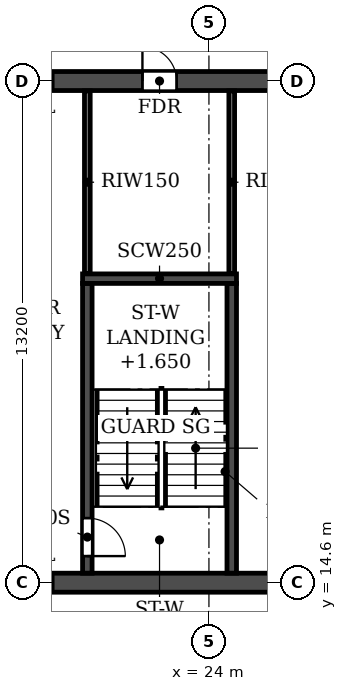
"""IFC4 building model, lengths in metres.
Left out: names, types, materials, properties, quantities, classifications, styles, units other than length and angle.
Written with IfcOpenShell. Run it as: python <this file> out.ifc"""

import sys

from ifc_helpers import new_model, si_unit, direction, frame, frame_2d, origin, place, context, subcontext, project, spatial, rectangle, extrude, element, fill, save


model = new_model("IFC4")
c1 = context("Model", 3, precision=1e-05, world=origin(), true_north=direction((0.0, 1.0)))
c2 = subcontext(c1, "Body", "Model", "MODEL_VIEW")
j1 = project(units=[si_unit("LENGTHUNIT", "METRE"), si_unit("PLANEANGLEUNIT", "RADIAN")], contexts=[c1])
p1 = place(None, origin())
s1 = spatial("IfcSite", under=j1, at=p1, CompositionType="ELEMENT")
p2 = place(p1, origin())
s2 = spatial("IfcBuilding", under=s1, at=p2, CompositionType="ELEMENT")
p3 = place(p2, frame((0.0, 0.0, 76.2)))
s3 = spatial("IfcBuildingStorey", under=s2, at=p3, CompositionType="ELEMENT", Elevation=76.2)
p4 = place(p3, frame((8.6, 14.6, 0.0), z_axis=(0.0, 0.0, 1.0), x_axis=(1.0, 0.0, 0.0)))
e1 = element("IfcWall", 1, at=p4, inside=s3, PredefinedType="SOLIDWALL", context=c2, shape_type="SweptSolid", body=[
    extrude(rectangle(XDim=84.8, YDim=0.5, at=frame_2d((42.4, 0.0))), origin(), (0.0, 0.0, 1.0), 3.06),
])
p5 = place(p4, frame((2.25, 0.0, 0.0)))
e2 = element("IfcOpeningElement", 2, at=p5, cuts=e1, PredefinedType="OPENING", context=c2, shape_type="SweptSolid", body=[
    extrude(rectangle(XDim=1.0, YDim=2.1, at=frame_2d((0.5, 1.05))), frame((0.0, 0.26, 0.0), z_axis=(0.0, -1.0, 0.0), x_axis=(1.0, 0.0, 0.0)), (0.0, 0.0, 1.0), 0.52),
])
p6 = place(p4, frame((6.95, 0.0, 0.0)))
e3 = element("IfcOpeningElement", 3, at=p6, cuts=e1, PredefinedType="OPENING", context=c2, shape_type="SweptSolid", body=[
    extrude(rectangle(XDim=1.0, YDim=2.1, at=frame_2d((0.5, 1.05))), frame((0.0, 0.26, 0.0), z_axis=(0.0, -1.0, 0.0), x_axis=(1.0, 0.0, 0.0)), (0.0, 0.0, 1.0), 0.52),
])
p7 = place(p4, frame((10.3, 0.0, 0.0)))
e4 = element("IfcOpeningElement", 4, at=p7, cuts=e1, PredefinedType="OPENING", context=c2, shape_type="SweptSolid", body=[
    extrude(rectangle(XDim=1.0, YDim=2.1, at=frame_2d((0.5, 1.05))), frame((0.0, 0.26, 0.0), z_axis=(0.0, -1.0, 0.0), x_axis=(1.0, 0.0, 0.0)), (0.0, 0.0, 1.0), 0.52),
])
p8 = place(p4, frame((18.2, 0.0, 0.0)))
e5 = element("IfcOpeningElement", 5, at=p8, cuts=e1, PredefinedType="OPENING", context=c2, shape_type="SweptSolid", body=[
    extrude(rectangle(XDim=1.0, YDim=2.1, at=frame_2d((0.5, 1.05))), frame((0.0, 0.26, 0.0), z_axis=(0.0, -1.0, 0.0), x_axis=(1.0, 0.0, 0.0)), (0.0, 0.0, 1.0), 0.52),
])
p9 = place(p4, frame((22.8, 0.0, 0.0)))
e6 = element("IfcOpeningElement", 6, at=p9, cuts=e1, PredefinedType="OPENING", context=c2, shape_type="SweptSolid", body=[
    extrude(rectangle(XDim=1.0, YDim=2.1, at=frame_2d((0.5, 1.05))), frame((0.0, 0.26, 0.0), z_axis=(0.0, -1.0, 0.0), x_axis=(1.0, 0.0, 0.0)), (0.0, 0.0, 1.0), 0.52),
])
p10 = place(p4, frame((35.4, 0.0, 0.0)))
e7 = element("IfcOpeningElement", 7, at=p10, cuts=e1, PredefinedType="OPENING", context=c2, shape_type="SweptSolid", body=[
    extrude(rectangle(XDim=1.0, YDim=2.1, at=frame_2d((0.5, 1.05))), frame((0.0, 0.26, 0.0), z_axis=(0.0, -1.0, 0.0), x_axis=(1.0, 0.0, 0.0)), (0.0, 0.0, 1.0), 0.52),
])
p11 = place(p4, frame((39.3, 0.0, 0.0)))
e8 = element("IfcOpeningElement", 8, at=p11, cuts=e1, PredefinedType="OPENING", context=c2, shape_type="SweptSolid", body=[
    extrude(rectangle(XDim=1.0, YDim=2.1, at=frame_2d((0.5, 1.05))), frame((0.0, 0.26, 0.0), z_axis=(0.0, -1.0, 0.0), x_axis=(1.0, 0.0, 0.0)), (0.0, 0.0, 1.0), 0.52),
])
p12 = place(p4, frame((41.9, 0.0, 0.0)))
e9 = element("IfcOpeningElement", 9, at=p12, cuts=e1, PredefinedType="OPENING", context=c2, shape_type="SweptSolid", body=[
    extrude(rectangle(XDim=1.0, YDim=2.1, at=frame_2d((0.5, 1.05))), frame((0.0, 0.26, 0.0), z_axis=(0.0, -1.0, 0.0), x_axis=(1.0, 0.0, 0.0)), (0.0, 0.0, 1.0), 0.52),
])
p13 = place(p4, frame((44.5, 0.0, 0.0)))
e10 = element("IfcOpeningElement", 10, at=p13, cuts=e1, PredefinedType="OPENING", context=c2, shape_type="SweptSolid", body=[
    extrude(rectangle(XDim=1.0, YDim=2.1, at=frame_2d((0.5, 1.05))), frame((0.0, 0.26, 0.0), z_axis=(0.0, -1.0, 0.0), x_axis=(1.0, 0.0, 0.0)), (0.0, 0.0, 1.0), 0.52),
])
p14 = place(p4, frame((48.4, 0.0, 0.0)))
e11 = element("IfcOpeningElement", 11, at=p14, cuts=e1, PredefinedType="OPENING", context=c2, shape_type="SweptSolid", body=[
    extrude(rectangle(XDim=1.0, YDim=2.1, at=frame_2d((0.5, 1.05))), frame((0.0, 0.26, 0.0), z_axis=(0.0, -1.0, 0.0), x_axis=(1.0, 0.0, 0.0)), (0.0, 0.0, 1.0), 0.52),
])
p15 = place(p4, frame((61.0, 0.0, 0.0)))
e12 = element("IfcOpeningElement", 12, at=p15, cuts=e1, PredefinedType="OPENING", context=c2, shape_type="SweptSolid", body=[
    extrude(rectangle(XDim=1.0, YDim=2.1, at=frame_2d((0.5, 1.05))), frame((0.0, 0.26, 0.0), z_axis=(0.0, -1.0, 0.0), x_axis=(1.0, 0.0, 0.0)), (0.0, 0.0, 1.0), 0.52),
])
p16 = place(p4, frame((65.6, 0.0, 0.0)))
e13 = element("IfcOpeningElement", 13, at=p16, cuts=e1, PredefinedType="OPENING", context=c2, shape_type="SweptSolid", body=[
    extrude(rectangle(XDim=1.0, YDim=2.1, at=frame_2d((0.5, 1.05))), frame((0.0, 0.26, 0.0), z_axis=(0.0, -1.0, 0.0), x_axis=(1.0, 0.0, 0.0)), (0.0, 0.0, 1.0), 0.52),
])
p17 = place(p4, frame((73.5, 0.0, 0.0)))
e14 = element("IfcOpeningElement", 14, at=p17, cuts=e1, PredefinedType="OPENING", context=c2, shape_type="SweptSolid", body=[
    extrude(rectangle(XDim=1.0, YDim=2.1, at=frame_2d((0.5, 1.05))), frame((0.0, 0.26, 0.0), z_axis=(0.0, -1.0, 0.0), x_axis=(1.0, 0.0, 0.0)), (0.0, 0.0, 1.0), 0.52),
])
p18 = place(p4, frame((76.55, 0.0, 0.0)))
e15 = element("IfcOpeningElement", 15, at=p18, cuts=e1, PredefinedType="OPENING", context=c2, shape_type="SweptSolid", body=[
    extrude(rectangle(XDim=1.0, YDim=2.1, at=frame_2d((0.5, 1.05))), frame((0.0, 0.26, 0.0), z_axis=(0.0, -1.0, 0.0), x_axis=(1.0, 0.0, 0.0)), (0.0, 0.0, 1.0), 0.52),
])
p19 = place(p4, frame((81.0, 0.0, 0.0)))
e16 = element("IfcOpeningElement", 16, at=p19, cuts=e1, PredefinedType="OPENING", context=c2, shape_type="SweptSolid", body=[
    extrude(rectangle(XDim=1.5, YDim=2.1, at=frame_2d((0.75, 1.05))), frame((0.0, 0.26, 0.0), z_axis=(0.0, -1.0, 0.0), x_axis=(1.0, 0.0, 0.0)), (0.0, 0.0, 1.0), 0.52),
])
p20 = place(p3, frame((8.6, 27.8, 0.0), z_axis=(0.0, 0.0, 1.0), x_axis=(1.0, 0.0, 0.0)))
e17 = element("IfcWall", 17, at=p20, inside=s3, PredefinedType="SOLIDWALL", context=c2, shape_type="SweptSolid", body=[
    extrude(rectangle(XDim=84.8, YDim=0.5, at=frame_2d((42.4, 0.0))), origin(), (0.0, 0.0, 1.0), 3.06),
])
p21 = place(p20, frame((2.0, 0.0, 0.0)))
e18 = element("IfcOpeningElement", 18, at=p21, cuts=e17, PredefinedType="OPENING", context=c2, shape_type="SweptSolid", body=[
    extrude(rectangle(XDim=1.5, YDim=2.1, at=frame_2d((0.75, 1.05))), frame((0.0, 0.26, 0.0), z_axis=(0.0, -1.0, 0.0), x_axis=(1.0, 0.0, 0.0)), (0.0, 0.0, 1.0), 0.52),
])
p22 = place(p20, frame((6.95, 0.0, 0.0)))
e19 = element("IfcOpeningElement", 19, at=p22, cuts=e17, PredefinedType="OPENING", context=c2, shape_type="SweptSolid", body=[
    extrude(rectangle(XDim=1.0, YDim=2.1, at=frame_2d((0.5, 1.05))), frame((0.0, 0.26, 0.0), z_axis=(0.0, -1.0, 0.0), x_axis=(1.0, 0.0, 0.0)), (0.0, 0.0, 1.0), 0.52),
])
p23 = place(p20, frame((10.3, 0.0, 0.0)))
e20 = element("IfcOpeningElement", 20, at=p23, cuts=e17, PredefinedType="OPENING", context=c2, shape_type="SweptSolid", body=[
    extrude(rectangle(XDim=1.0, YDim=2.1, at=frame_2d((0.5, 1.05))), frame((0.0, 0.26, 0.0), z_axis=(0.0, -1.0, 0.0), x_axis=(1.0, 0.0, 0.0)), (0.0, 0.0, 1.0), 0.52),
])
p24 = place(p20, frame((13.65, 0.0, 0.0)))
e21 = element("IfcOpeningElement", 21, at=p24, cuts=e17, PredefinedType="OPENING", context=c2, shape_type="SweptSolid", body=[
    extrude(rectangle(XDim=0.9, YDim=2.1, at=frame_2d((0.45, 1.05))), frame((0.0, 0.26, 0.0), z_axis=(0.0, -1.0, 0.0), x_axis=(1.0, 0.0, 0.0)), (0.0, 0.0, 1.0), 0.52),
])
p25 = place(p20, frame((22.85, 0.0, 0.0)))
e22 = element("IfcOpeningElement", 22, at=p25, cuts=e17, PredefinedType="OPENING", context=c2, shape_type="SweptSolid", body=[
    extrude(rectangle(XDim=0.9, YDim=2.1, at=frame_2d((0.45, 1.05))), frame((0.0, 0.26, 0.0), z_axis=(0.0, -1.0, 0.0), x_axis=(1.0, 0.0, 0.0)), (0.0, 0.0, 1.0), 0.52),
])
p26 = place(p20, frame((26.0, 0.0, 0.0)))
e23 = element("IfcOpeningElement", 23, at=p26, cuts=e17, PredefinedType="OPENING", context=c2, shape_type="SweptSolid", body=[
    extrude(rectangle(XDim=1.0, YDim=2.1, at=frame_2d((0.5, 1.05))), frame((0.0, 0.26, 0.0), z_axis=(0.0, -1.0, 0.0), x_axis=(1.0, 0.0, 0.0)), (0.0, 0.0, 1.0), 0.52),
])
p27 = place(p20, frame((31.2, 0.0, 0.0)))
e24 = element("IfcOpeningElement", 24, at=p27, cuts=e17, PredefinedType="OPENING", context=c2, shape_type="SweptSolid", body=[
    extrude(rectangle(XDim=1.0, YDim=2.1, at=frame_2d((0.5, 1.05))), frame((0.0, 0.26, 0.0), z_axis=(0.0, -1.0, 0.0), x_axis=(1.0, 0.0, 0.0)), (0.0, 0.0, 1.0), 0.52),
])
p28 = place(p20, frame((39.0, 0.0, 0.0)))
e25 = element("IfcOpeningElement", 25, at=p28, cuts=e17, PredefinedType="OPENING", context=c2, shape_type="SweptSolid", body=[
    extrude(rectangle(XDim=1.0, YDim=2.1, at=frame_2d((0.5, 1.05))), frame((0.0, 0.26, 0.0), z_axis=(0.0, -1.0, 0.0), x_axis=(1.0, 0.0, 0.0)), (0.0, 0.0, 1.0), 0.52),
])
p29 = place(p20, frame((41.9, 0.0, 0.0)))
e26 = element("IfcOpeningElement", 26, at=p29, cuts=e17, PredefinedType="OPENING", context=c2, shape_type="SweptSolid", body=[
    extrude(rectangle(XDim=1.0, YDim=2.1, at=frame_2d((0.5, 1.05))), frame((0.0, 0.26, 0.0), z_axis=(0.0, -1.0, 0.0), x_axis=(1.0, 0.0, 0.0)), (0.0, 0.0, 1.0), 0.52),
])
p30 = place(p20, frame((44.8, 0.0, 0.0)))
e27 = element("IfcOpeningElement", 27, at=p30, cuts=e17, PredefinedType="OPENING", context=c2, shape_type="SweptSolid", body=[
    extrude(rectangle(XDim=1.0, YDim=2.1, at=frame_2d((0.5, 1.05))), frame((0.0, 0.26, 0.0), z_axis=(0.0, -1.0, 0.0), x_axis=(1.0, 0.0, 0.0)), (0.0, 0.0, 1.0), 0.52),
])
p31 = place(p20, frame((48.7, 0.0, 0.0)))
e28 = element("IfcOpeningElement", 28, at=p31, cuts=e17, PredefinedType="OPENING", context=c2, shape_type="SweptSolid", body=[
    extrude(rectangle(XDim=1.0, YDim=2.1, at=frame_2d((0.5, 1.05))), frame((0.0, 0.26, 0.0), z_axis=(0.0, -1.0, 0.0), x_axis=(1.0, 0.0, 0.0)), (0.0, 0.0, 1.0), 0.52),
])
p32 = place(p20, frame((55.2, 0.0, 0.0)))
e29 = element("IfcOpeningElement", 29, at=p32, cuts=e17, PredefinedType="OPENING", context=c2, shape_type="SweptSolid", body=[
    extrude(rectangle(XDim=1.0, YDim=2.1, at=frame_2d((0.5, 1.05))), frame((0.0, 0.26, 0.0), z_axis=(0.0, -1.0, 0.0), x_axis=(1.0, 0.0, 0.0)), (0.0, 0.0, 1.0), 0.52),
])
p33 = place(p20, frame((61.05, 0.0, 0.0)))
e30 = element("IfcOpeningElement", 30, at=p33, cuts=e17, PredefinedType="OPENING", context=c2, shape_type="SweptSolid", body=[
    extrude(rectangle(XDim=0.9, YDim=2.1, at=frame_2d((0.45, 1.05))), frame((0.0, 0.26, 0.0), z_axis=(0.0, -1.0, 0.0), x_axis=(1.0, 0.0, 0.0)), (0.0, 0.0, 1.0), 0.52),
])
p34 = place(p20, frame((70.25, 0.0, 0.0)))
e31 = element("IfcOpeningElement", 31, at=p34, cuts=e17, PredefinedType="OPENING", context=c2, shape_type="SweptSolid", body=[
    extrude(rectangle(XDim=0.9, YDim=2.1, at=frame_2d((0.45, 1.05))), frame((0.0, 0.26, 0.0), z_axis=(0.0, -1.0, 0.0), x_axis=(1.0, 0.0, 0.0)), (0.0, 0.0, 1.0), 0.52),
])
p35 = place(p20, frame((73.5, 0.0, 0.0)))
e32 = element("IfcOpeningElement", 32, at=p35, cuts=e17, PredefinedType="OPENING", context=c2, shape_type="SweptSolid", body=[
    extrude(rectangle(XDim=1.0, YDim=2.1, at=frame_2d((0.5, 1.05))), frame((0.0, 0.26, 0.0), z_axis=(0.0, -1.0, 0.0), x_axis=(1.0, 0.0, 0.0)), (0.0, 0.0, 1.0), 0.52),
])
p36 = place(p20, frame((76.25, 0.0, 0.0)))
e33 = element("IfcOpeningElement", 33, at=p36, cuts=e17, PredefinedType="OPENING", context=c2, shape_type="SweptSolid", body=[
    extrude(rectangle(XDim=1.0, YDim=2.1, at=frame_2d((0.5, 1.05))), frame((0.0, 0.26, 0.0), z_axis=(0.0, -1.0, 0.0), x_axis=(1.0, 0.0, 0.0)), (0.0, 0.0, 1.0), 0.52),
])
p37 = place(p20, frame((80.95, 0.0, 0.0)))
e34 = element("IfcOpeningElement", 34, at=p37, cuts=e17, PredefinedType="OPENING", context=c2, shape_type="SweptSolid", body=[
    extrude(rectangle(XDim=1.0, YDim=2.1, at=frame_2d((0.5, 1.05))), frame((0.0, 0.26, 0.0), z_axis=(0.0, -1.0, 0.0), x_axis=(1.0, 0.0, 0.0)), (0.0, 0.0, 1.0), 0.52),
])
p38 = place(p3, frame((20.8, 14.85, 0.0), z_axis=(0.0, 0.0, 1.0), x_axis=(0.0, 1.0, 0.0)))
e35 = element("IfcWall", 35, at=p38, inside=s3, PredefinedType="SOLIDWALL", context=c2, shape_type="SweptSolid", body=[
    extrude(rectangle(XDim=7.625, YDim=0.25, at=frame_2d((3.812, 0.0))), origin(), (0.0, 0.0, 1.0), 3.06),
])
p39 = place(p38, frame((0.45, 0.0, 0.0)))
e36 = element("IfcOpeningElement", 36, at=p39, cuts=e35, PredefinedType="OPENING", context=c2, shape_type="SweptSolid", body=[
    extrude(rectangle(XDim=1.0, YDim=2.1, at=frame_2d((0.5, 1.05))), frame((0.0, 0.135, 0.0), z_axis=(0.0, -1.0, 0.0), x_axis=(1.0, 0.0, 0.0)), (0.0, 0.0, 1.0), 0.27),
])
p40 = place(p3, frame((24.6, 14.85, 0.0), z_axis=(0.0, 0.0, 1.0), x_axis=(0.0, 1.0, 0.0)))
e37 = element("IfcWall", 37, at=p40, inside=s3, PredefinedType="SOLIDWALL", context=c2, shape_type="SweptSolid", body=[
    extrude(rectangle(XDim=7.625, YDim=0.25, at=frame_2d((3.812, 0.0))), origin(), (0.0, 0.0, 1.0), 3.06),
])
p41 = place(p3, frame((20.675, 22.6, 0.0), z_axis=(0.0, 0.0, 1.0), x_axis=(1.0, 0.0, 0.0)))
e38 = element("IfcWall", 38, at=p41, inside=s3, PredefinedType="SOLIDWALL", context=c2, shape_type="SweptSolid", body=[
    extrude(rectangle(XDim=4.05, YDim=0.25, at=frame_2d((2.025, 0.0))), origin(), (0.0, 0.0, 1.0), 3.06),
])
for number, where, z_axis, x_axis in (
    (39, (20.8, 22.735, 0.0), (0.0, 0.0, 1.0), (0.0, 1.0, 0.0)),
    (40, (24.6, 22.735, 0.0), (0.0, 0.0, 1.0), (0.0, 1.0, 0.0)),
):
    element("IfcWall", number, at=place(p3, frame(where, z_axis=z_axis, x_axis=x_axis)), inside=s3, PredefinedType="PARTITIONING", context=c2, shape_type="SweptSolid", body=[
        extrude(rectangle(XDim=4.805, YDim=0.15, at=frame_2d((2.402, 0.0))), origin(), (0.0, 0.0, 1.0), 3.06),
    ])
p42 = place(p23, origin())
e41 = element("IfcDoor", 41, at=p42, inside=s3, OperationType="SINGLE_SWING_LEFT", PredefinedType="DOOR", context=c2, shape_type="SweptSolid", body=[
    extrude(rectangle(XDim=1.0, YDim=2.1, at=frame_2d((0.5, 1.05))), frame((0.0, 0.025, 0.0), z_axis=(0.0, -1.0, 0.0), x_axis=(1.0, 0.0, 0.0)), (0.0, 0.0, 1.0), 0.05),
])
fill(e20, e41)
p43 = place(p24, origin())
e42 = element("IfcDoor", 42, at=p43, inside=s3, OperationType="SINGLE_SWING_LEFT", PredefinedType="DOOR", context=c2, shape_type="SweptSolid", body=[
    extrude(rectangle(XDim=0.9, YDim=2.1, at=frame_2d((0.45, 1.05))), frame((0.0, 0.025, 0.0), z_axis=(0.0, -1.0, 0.0), x_axis=(1.0, 0.0, 0.0)), (0.0, 0.0, 1.0), 0.05),
])
fill(e21, e42)
p44 = place(p7, frame((1.0, 0.0, 0.0), z_axis=(0.0, 0.0, 1.0), x_axis=(-1.0, 0.0, 0.0)))
e43 = element("IfcDoor", 43, at=p44, inside=s3, OperationType="SINGLE_SWING_RIGHT", PredefinedType="DOOR", context=c2, shape_type="SweptSolid", body=[
    extrude(rectangle(XDim=1.0, YDim=2.1, at=frame_2d((0.5, 1.05))), frame((0.0, 0.025, 0.0), z_axis=(0.0, -1.0, 0.0), x_axis=(1.0, 0.0, 0.0)), (0.0, 0.0, 1.0), 0.05),
])
fill(e4, e43)
p45 = place(p39, frame((1.0, 0.0, 0.0), z_axis=(0.0, 0.0, 1.0), x_axis=(-1.0, 0.0, 0.0)))
e44 = element("IfcDoor", 44, at=p45, inside=s3, OperationType="SINGLE_SWING_RIGHT", PredefinedType="DOOR", context=c2, shape_type="SweptSolid", body=[
    extrude(rectangle(XDim=1.0, YDim=2.1, at=frame_2d((0.5, 1.05))), frame((0.0, 0.025, 0.0), z_axis=(0.0, -1.0, 0.0), x_axis=(1.0, 0.0, 0.0)), (0.0, 0.0, 1.0), 0.05),
])
fill(e36, e44)
save(model, sys.argv[1])
